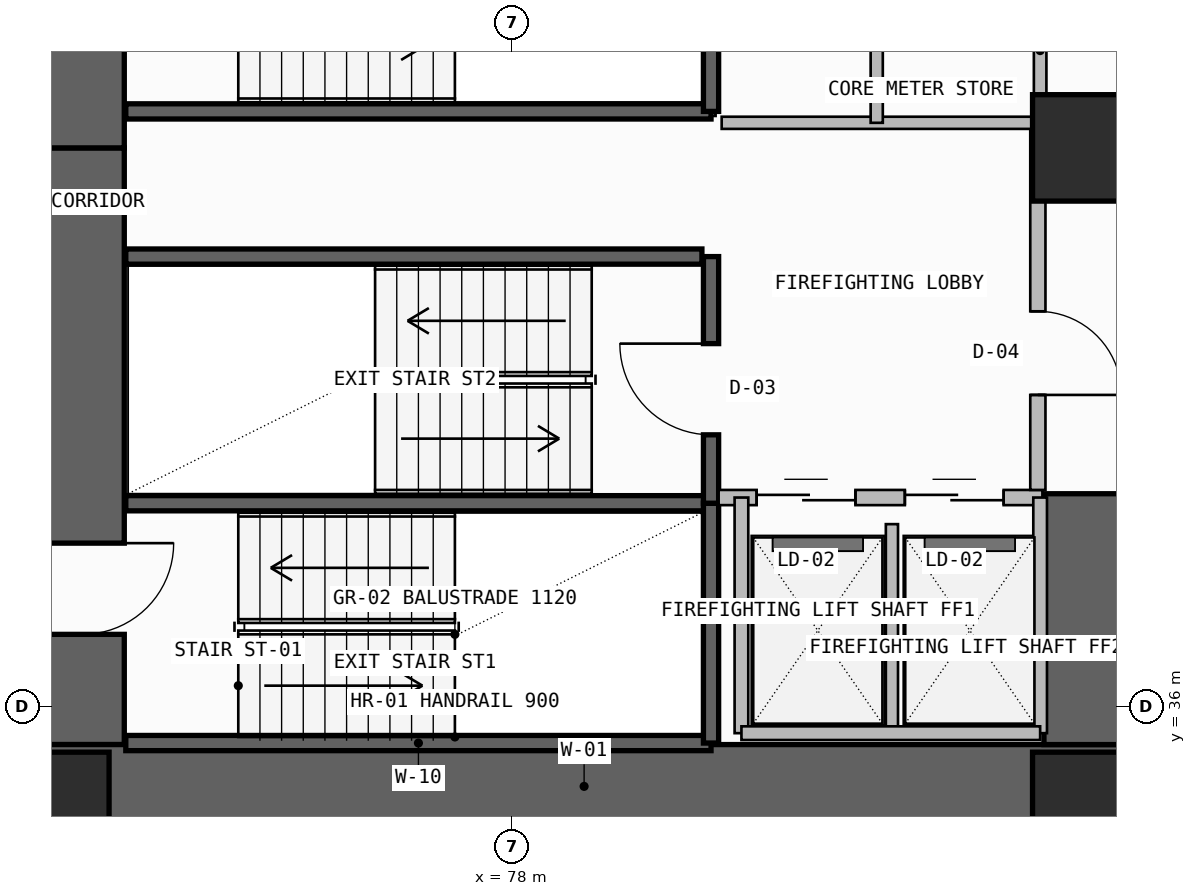
"""IFC4 building model, lengths in metres.
Left out: names, types, materials, properties, quantities, classifications, styles, units other than length and angle.
Written with IfcOpenShell. Run it as: python <this file> out.ifc"""

import sys

from ifc_helpers import new_model, si_unit, direction, frame, frame_2d, origin, origin_2d, place, context, subcontext, project, spatial, rectangle, extrude, element, fill, save


model = new_model("IFC4")
c1 = context("Model", 3, precision=1e-05, world=origin(), true_north=direction((0.0, 1.0)))
c2 = subcontext(c1, "Body", "Model", "MODEL_VIEW")
j1 = project(units=[si_unit("LENGTHUNIT", "METRE"), si_unit("PLANEANGLEUNIT", "RADIAN")], contexts=[c1])
p1 = place(None, origin())
s1 = spatial("IfcSite", under=j1, at=p1, CompositionType="ELEMENT")
p2 = place(p1, origin())
s2 = spatial("IfcBuilding", under=s1, at=p2, CompositionType="ELEMENT")
p3 = place(p2, frame((0.0, 0.0, 88.5)))
s3 = spatial("IfcBuildingStorey", under=s2, at=p3, CompositionType="ELEMENT", Elevation=88.5)
p4 = place(p3, frame((72.35, 35.5, -0.26), z_axis=(0.0, 0.0, 1.0), x_axis=(0.0, 1.0, 0.0)))
e1 = element("IfcWall", 1, at=p4, inside=s3, PredefinedType="SHEAR", context=c2, shape_type="SweptSolid", body=[
    extrude(rectangle(XDim=7.85, YDim=1.1, at=frame_2d((3.925, 0.0))), origin(), (0.0, 0.0, 1.0), 3.6),
])
p5 = place(p4, frame((1.45, 0.0, 0.26)))
e2 = element("IfcOpeningElement", 2, at=p5, cuts=e1, PredefinedType="OPENING", context=c2, shape_type="SweptSolid", body=[
    extrude(rectangle(XDim=1.2, YDim=2.2, at=frame_2d((0.6, 1.1))), frame((0.0, 0.56, 0.0), z_axis=(0.0, -1.0, 0.0), x_axis=(1.0, 0.0, 0.0)), (0.0, 0.0, 1.0), 1.12),
])
p6 = place(p3, frame((71.8, 34.95, -0.26), z_axis=(0.0, 0.0, 1.0), x_axis=(1.0, 0.0, 0.0)))
e3 = element("IfcWall", 3, at=p6, inside=s3, PredefinedType="SHEAR", context=c2, shape_type="SweptSolid", body=[
    extrude(rectangle(XDim=14.3, YDim=1.1, at=frame_2d((7.15, 0.0))), origin(), (0.0, 0.0, 1.0), 3.6),
])
p7 = place(p3, frame((85.55, 35.5, -0.26), z_axis=(0.0, 0.0, 1.0), x_axis=(0.0, 1.0, 0.0)))
e4 = element("IfcWall", 4, at=p7, inside=s3, PredefinedType="SHEAR", context=c2, shape_type="SweptSolid", body=[
    extrude(rectangle(XDim=3.3, YDim=1.1, at=frame_2d((1.65, 0.0))), origin(), (0.0, 0.0, 1.0), 3.6),
])
p8 = place(p3, frame((72.35, 43.35, -0.26), z_axis=(0.0, 0.0, 1.0), x_axis=(0.0, 1.0, 0.0)))
e5 = element("IfcWall", 5, at=p8, inside=s3, PredefinedType="SHEAR", context=c2, shape_type="SweptSolid", body=[
    extrude(rectangle(XDim=12.7, YDim=1.1, at=frame_2d((6.35, 0.0))), origin(), (0.0, 0.0, 1.0), 3.6),
])
p9 = place(p8, frame((1.35, 0.0, 0.26)))
e6 = element("IfcOpeningElement", 6, at=p9, cuts=e5, PredefinedType="OPENING", context=c2, shape_type="SweptSolid", body=[
    extrude(rectangle(XDim=1.2, YDim=2.2, at=frame_2d((0.6, 1.1))), frame((0.0, 0.56, 0.0), z_axis=(0.0, -1.0, 0.0), x_axis=(1.0, 0.0, 0.0)), (0.0, 0.0, 1.0), 1.12),
])
for number, where, z_axis, x_axis in (
    (7, (72.0, 34.7, 0.0), (0.0, 0.0, 1.0), (1.0, 0.0, 0.0)),
    (8, (85.55, 34.7, 0.0), (0.0, 0.0, 1.0), (1.0, 0.0, 0.0)),
    (9, (85.55, 43.35, 0.0), (0.0, 0.0, 1.0), (1.0, 0.0, 0.0)),
):
    element("IfcColumn", number, at=place(p3, frame(where, z_axis=z_axis, x_axis=x_axis)), inside=s3, PredefinedType="COLUMN", context=c2, shape_type="SweptSolid", body=[
        extrude(rectangle(XDim=1.4, YDim=1.4, at=origin_2d()), origin(), (0.0, 0.0, 1.0), 3.6),
    ])
p10 = place(p3, frame((84.957, 32.751, -0.26), z_axis=(0.0, 0.0, 1.0), x_axis=(0.997859046449, 0.065401249368, 0.0)))
e10 = element("IfcWall", 10, at=p10, inside=s3, PredefinedType="SHEAR", context=c2, shape_type="SweptSolid", body=[
    extrude(rectangle(XDim=28.4, YDim=0.85, at=frame_2d((14.2, 0.0))), origin(), (0.0, 0.0, 1.0), 3.6),
])
p11 = place(p10, frame((5.7, 0.0, 1.2)))
e11 = element("IfcOpeningElement", 11, at=p11, cuts=e10, PredefinedType="OPENING", context=c2, shape_type="SweptSolid", body=[
    extrude(rectangle(XDim=2.4, YDim=0.9, at=frame_2d((1.2, 0.45))), frame((0.0, 0.435, 0.0), z_axis=(0.0, -1.0, 0.0), x_axis=(1.0, 0.0, 0.0)), (0.0, 0.0, 1.0), 0.87),
])
for number, where, z_axis, x_axis in (
    (12, (72.92, 35.52, -0.26), (0.0, 0.0, 1.0), (1.0, 0.0, 0.0)),
    (13, (72.92, 38.675, -0.26), (0.0, 0.0, 1.0), (1.0, 0.0, 0.0)),
):
    element("IfcWall", number, at=place(p3, frame(where, z_axis=z_axis, x_axis=x_axis)), inside=s3, PredefinedType="SOLIDWALL", context=c2, shape_type="SweptSolid", body=[
        extrude(rectangle(XDim=7.7, YDim=0.2, at=frame_2d((3.85, 0.0))), origin(), (0.0, 0.0, 1.0), 3.6),
    ])
p12 = place(p3, frame((80.62, 35.52, -0.26), z_axis=(0.0, 0.0, 1.0), x_axis=(0.0, 1.0, 0.0)))
e14 = element("IfcWall", 14, at=p12, inside=s3, PredefinedType="SOLIDWALL", context=c2, shape_type="SweptSolid", body=[
    extrude(rectangle(XDim=3.155, YDim=0.2, at=frame_2d((1.578, 0.0))), origin(), (0.0, 0.0, 1.0), 3.6),
])
p13 = place(p3, frame((80.62, 38.675, -0.26), z_axis=(0.0, 0.0, 1.0), x_axis=(0.0, 1.0, 0.0)))
e15 = element("IfcWall", 15, at=p13, inside=s3, PredefinedType="SOLIDWALL", context=c2, shape_type="SweptSolid", body=[
    extrude(rectangle(XDim=3.245, YDim=0.2, at=frame_2d((1.623, 0.0))), origin(), (0.0, 0.0, 1.0), 3.6),
])
p14 = place(p13, frame((0.9, 0.0, 0.26)))
e16 = element("IfcOpeningElement", 16, at=p14, cuts=e15, PredefinedType="OPENING", context=c2, shape_type="SweptSolid", body=[
    extrude(rectangle(XDim=1.2, YDim=2.2, at=frame_2d((0.6, 1.1))), frame((0.0, 0.11, 0.0), z_axis=(0.0, -1.0, 0.0), x_axis=(1.0, 0.0, 0.0)), (0.0, 0.0, 1.0), 0.22),
])
p15 = place(p3, frame((80.72, 38.75, 0.0), z_axis=(0.0, 0.0, 1.0), x_axis=(1.0, 0.0, 0.0)))
e17 = element("IfcWall", 17, at=p15, inside=s3, PredefinedType="SOLIDWALL", context=c2, shape_type="SweptSolid", body=[
    extrude(rectangle(XDim=4.26, YDim=0.2, at=frame_2d((2.13, 0.0))), origin(), (0.0, 0.0, 1.0), 3.34),
])
p16 = place(p15, frame((0.5, 0.0, 0.0)))
e18 = element("IfcOpeningElement", 18, at=p16, cuts=e17, PredefinedType="OPENING", context=c2, shape_type="SweptSolid", body=[
    extrude(rectangle(XDim=1.3, YDim=2.3, at=frame_2d((0.65, 1.15))), frame((0.0, 0.11, 0.0), z_axis=(0.0, -1.0, 0.0), x_axis=(1.0, 0.0, 0.0)), (0.0, 0.0, 1.0), 0.22),
])
p17 = place(p15, frame((2.45, 0.0, 0.0)))
e19 = element("IfcOpeningElement", 19, at=p17, cuts=e17, PredefinedType="OPENING", context=c2, shape_type="SweptSolid", body=[
    extrude(rectangle(XDim=1.3, YDim=2.3, at=frame_2d((0.65, 1.15))), frame((0.0, 0.11, 0.0), z_axis=(0.0, -1.0, 0.0), x_axis=(1.0, 0.0, 0.0)), (0.0, 0.0, 1.0), 0.22),
])
p18 = place(p3, frame((83.0, 35.65, 0.0), z_axis=(0.0, 0.0, 1.0), x_axis=(0.0, 1.0, 0.0)))
e20 = element("IfcWall", 20, at=p18, inside=s3, PredefinedType="PLUMBINGWALL", context=c2, shape_type="SweptSolid", body=[
    extrude(rectangle(XDim=2.75, YDim=0.16, at=frame_2d((1.375, 0.0))), origin(), (0.0, 0.0, 1.0), 3.34),
])
for number, where, z_axis, x_axis in (
    (21, (84.95, 35.65, 0.0), (0.0, 0.0, 1.0), (0.0, 1.0, 0.0)),
    (22, (81.02, 35.65, 0.0), (0.0, 0.0, 1.0), (0.0, 1.0, 0.0)),
):
    element("IfcWall", number, at=place(p3, frame(where, z_axis=z_axis, x_axis=x_axis)), inside=s3, PredefinedType="SOLIDWALL", context=c2, shape_type="SweptSolid", body=[
        extrude(rectangle(XDim=3.1, YDim=0.18, at=frame_2d((1.55, 0.0))), origin(), (0.0, 0.0, 1.0), 3.34),
    ])
p19 = place(p3, frame((81.02, 35.65, 0.0), z_axis=(0.0, 0.0, 1.0), x_axis=(1.0, 0.0, 0.0)))
e23 = element("IfcWall", 23, at=p19, inside=s3, PredefinedType="SOLIDWALL", context=c2, shape_type="SweptSolid", body=[
    extrude(rectangle(XDim=3.93, YDim=0.18, at=frame_2d((1.965, 0.0))), origin(), (0.0, 0.0, 1.0), 3.34),
])
p20 = place(p3, frame((84.92, 38.85, 0.0), z_axis=(0.0, 0.0, 1.0), x_axis=(0.0, 1.0, 0.0)))
e24 = element("IfcWall", 24, at=p20, inside=s3, PredefinedType="SOLIDWALL", context=c2, shape_type="SweptSolid", body=[
    extrude(rectangle(XDim=4.83, YDim=0.2, at=frame_2d((2.415, 0.0))), origin(), (0.0, 0.0, 1.0), 3.34),
])
p21 = place(p20, frame((1.25, 0.0, 0.0)))
e25 = element("IfcOpeningElement", 25, at=p21, cuts=e24, PredefinedType="OPENING", context=c2, shape_type="SweptSolid", body=[
    extrude(rectangle(XDim=1.1, YDim=2.2, at=frame_2d((0.55, 1.1))), frame((0.0, 0.11, 0.0), z_axis=(0.0, -1.0, 0.0), x_axis=(1.0, 0.0, 0.0)), (0.0, 0.0, 1.0), 0.22),
])
p22 = place(p3, frame((72.92, 41.92, -0.26), z_axis=(0.0, 0.0, 1.0), x_axis=(1.0, 0.0, 0.0)))
e26 = element("IfcWall", 26, at=p22, inside=s3, PredefinedType="SOLIDWALL", context=c2, shape_type="SweptSolid", body=[
    extrude(rectangle(XDim=7.58, YDim=0.2, at=frame_2d((3.79, 0.0))), origin(), (0.0, 0.0, 1.0), 3.6),
])
p23 = place(p3, frame((72.92, 43.83, -0.26), z_axis=(0.0, 0.0, 1.0), x_axis=(1.0, 0.0, 0.0)))
e27 = element("IfcWall", 27, at=p23, inside=s3, PredefinedType="SOLIDWALL", context=c2, shape_type="SweptSolid", body=[
    extrude(rectangle(XDim=7.7, YDim=0.2, at=frame_2d((3.85, 0.0))), origin(), (0.0, 0.0, 1.0), 3.6),
])
p24 = place(p3, frame((80.62, 43.83, -0.26), z_axis=(0.0, 0.0, 1.0), x_axis=(0.0, 1.0, 0.0)))
e28 = element("IfcWall", 28, at=p24, inside=s3, PredefinedType="SOLIDWALL", context=c2, shape_type="SweptSolid", body=[
    extrude(rectangle(XDim=3.24, YDim=0.2, at=frame_2d((1.62, 0.0))), origin(), (0.0, 0.0, 1.0), 3.6),
])
p25 = place(p3, frame((84.95, 43.68, 0.0), z_axis=(0.0, 0.0, 1.0), x_axis=(0.0, 1.0, 0.0)))
e29 = element("IfcWall", 29, at=p25, inside=s3, PredefinedType="PLUMBINGWALL", context=c2, shape_type="SweptSolid", body=[
    extrude(rectangle(XDim=1.9, YDim=0.165, at=frame_2d((0.95, 0.0))), origin(), (0.0, 0.0, 1.0), 3.34),
])
p26 = place(p3, frame((80.76, 43.68, 0.0), z_axis=(0.0, 0.0, 1.0), x_axis=(1.0, 0.0, 0.0)))
e30 = element("IfcWall", 30, at=p26, inside=s3, PredefinedType="PLUMBINGWALL", context=c2, shape_type="SweptSolid", body=[
    extrude(rectangle(XDim=4.19, YDim=0.16, at=frame_2d((2.095, 0.0))), origin(), (0.0, 0.0, 1.0), 3.34),
])
p27 = place(p3, frame((82.8, 43.68, 0.0), z_axis=(0.0, 0.0, 1.0), x_axis=(0.0, 1.0, 0.0)))
e31 = element("IfcWall", 31, at=p27, inside=s3, PredefinedType="PLUMBINGWALL", context=c2, shape_type="SweptSolid", body=[
    extrude(rectangle(XDim=1.9, YDim=0.16, at=frame_2d((0.95, 0.0))), origin(), (0.0, 0.0, 1.0), 3.34),
])
p28 = place(p5, frame((1.2, 0.0, 0.0), z_axis=(0.0, 0.0, 1.0), x_axis=(-1.0, 0.0, 0.0)))
e32 = element("IfcDoor", 32, at=p28, inside=s3, OperationType="SINGLE_SWING_LEFT", PredefinedType="USERDEFINED", context=c2, shape_type="SweptSolid", body=[
    extrude(rectangle(XDim=1.2, YDim=2.2, at=frame_2d((0.6, 1.1))), frame((0.0, 0.025, 0.0), z_axis=(0.0, -1.0, 0.0), x_axis=(1.0, 0.0, 0.0)), (0.0, 0.0, 1.0), 0.05),
])
fill(e2, e32)
p29 = place(p14, origin())
e33 = element("IfcDoor", 33, at=p29, inside=s3, OperationType="SINGLE_SWING_RIGHT", PredefinedType="USERDEFINED", context=c2, shape_type="SweptSolid", body=[
    extrude(rectangle(XDim=1.2, YDim=2.2, at=frame_2d((0.6, 1.1))), frame((0.0, 0.025, 0.0), z_axis=(0.0, -1.0, 0.0), x_axis=(1.0, 0.0, 0.0)), (0.0, 0.0, 1.0), 0.05),
])
fill(e16, e33)
p30 = place(p16, origin())
e34 = element("IfcDoor", 34, at=p30, inside=s3, OperationType="DOUBLE_DOOR_SLIDING", PredefinedType="DOOR", context=c2, shape_type="SweptSolid", body=[
    extrude(rectangle(XDim=1.3, YDim=2.3, at=frame_2d((0.65, 1.15))), frame((0.0, 0.025, 0.0), z_axis=(0.0, -1.0, 0.0), x_axis=(1.0, 0.0, 0.0)), (0.0, 0.0, 1.0), 0.05),
])
fill(e18, e34)
p31 = place(p17, origin())
e35 = element("IfcDoor", 35, at=p31, inside=s3, OperationType="DOUBLE_DOOR_SLIDING", PredefinedType="DOOR", context=c2, shape_type="SweptSolid", body=[
    extrude(rectangle(XDim=1.3, YDim=2.3, at=frame_2d((0.65, 1.15))), frame((0.0, 0.025, 0.0), z_axis=(0.0, -1.0, 0.0), x_axis=(1.0, 0.0, 0.0)), (0.0, 0.0, 1.0), 0.05),
])
fill(e19, e35)
p32 = place(p21, frame((1.1, 0.0, 0.0), z_axis=(0.0, 0.0, 1.0), x_axis=(-1.0, 0.0, 0.0)))
e36 = element("IfcDoor", 36, at=p32, inside=s3, OperationType="SINGLE_SWING_RIGHT", PredefinedType="DOOR", context=c2, shape_type="SweptSolid", body=[
    extrude(rectangle(XDim=1.1, YDim=2.2, at=frame_2d((0.55, 1.1))), frame((0.0, 0.025, 0.0), z_axis=(0.0, -1.0, 0.0), x_axis=(1.0, 0.0, 0.0)), (0.0, 0.0, 1.0), 0.05),
])
fill(e25, e36)
save(model, sys.argv[1])
